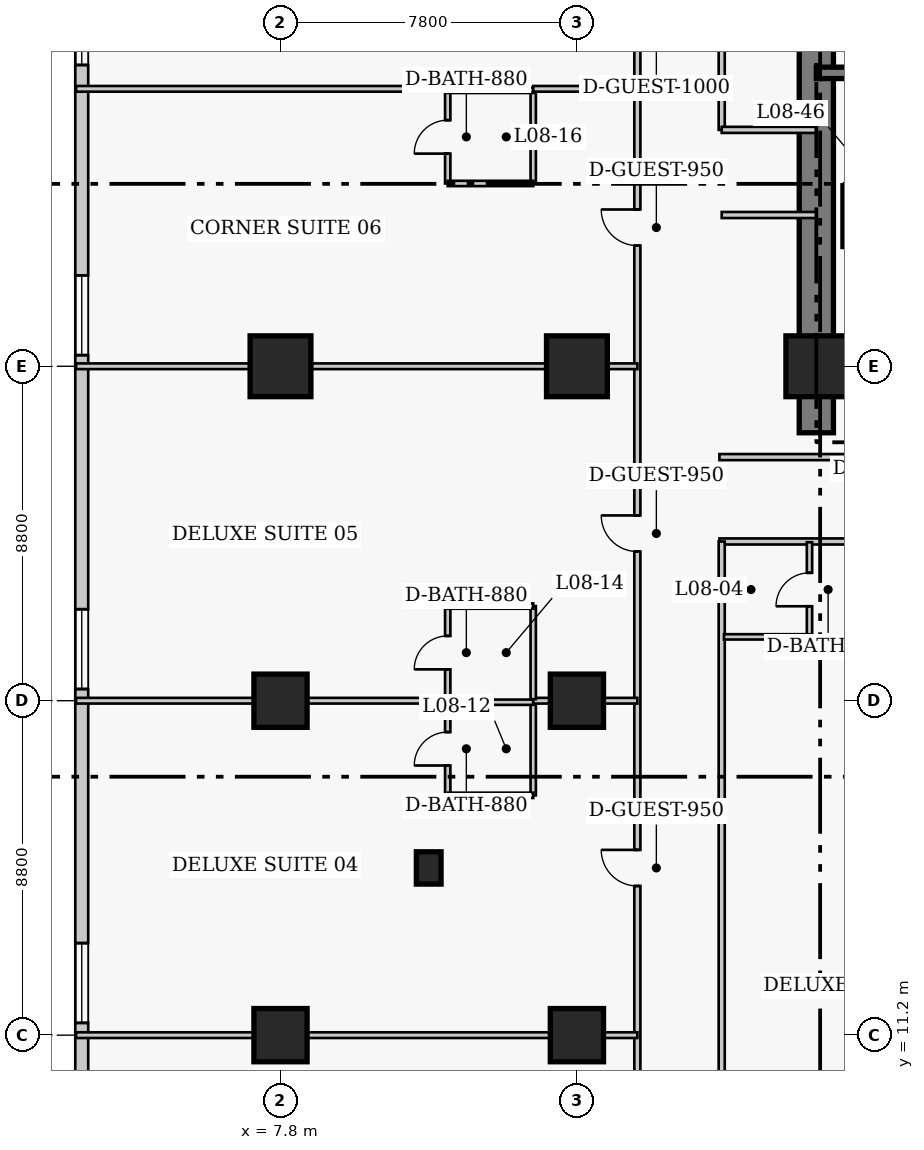
"""IFC4 building model, lengths in metres.
Left out: names, types, materials, properties, quantities, classifications, styles, units other than length and angle.
Written with IfcOpenShell. Run it as: python <this file> out.ifc"""

import sys

from ifc_helpers import new_model, si_unit, direction, frame, frame_2d, origin, origin_2d, place, context, subcontext, project, spatial, rectangle, extrude, element, fill, save


model = new_model("IFC4")
c1 = context("Model", 3, precision=1e-05, world=origin(), true_north=direction((0.0, 1.0)))
c2 = subcontext(c1, "Body", "Model", "MODEL_VIEW")
j1 = project(units=[si_unit("LENGTHUNIT", "METRE"), si_unit("PLANEANGLEUNIT", "RADIAN")], contexts=[c1])
p1 = place(None, origin())
s1 = spatial("IfcSite", under=j1, at=p1, CompositionType="ELEMENT")
p2 = place(p1, origin())
s2 = spatial("IfcBuilding", under=s1, at=p2, CompositionType="ELEMENT")
p3 = place(p2, frame((0.0, 0.0, 37.4)))
s3 = spatial("IfcBuildingStorey", under=s2, at=p3, CompositionType="ELEMENT", Elevation=37.4)
p4 = place(p3, frame((21.9, 27.05, 0.0), z_axis=(0.0, 0.0, 1.0), x_axis=(0.0, 1.0, 0.0)))
e1 = element("IfcWall", 1, at=p4, inside=s3, PredefinedType="SHEAR", context=c2, shape_type="SweptSolid", body=[
    extrude(rectangle(XDim=13.72, YDim=0.9, at=frame_2d((6.86, 0.0))), origin(), (0.0, 0.0, 1.0), 3.8),
])
p5 = place(p3, frame((21.9, 36.52, 0.0), z_axis=(0.0, 0.0, 1.0), x_axis=(1.0, 0.0, 0.0)))
e2 = element("IfcWall", 2, at=p5, inside=s3, PredefinedType="SHEAR", context=c2, shape_type="SweptSolid", body=[
    extrude(rectangle(XDim=8.32, YDim=0.3, at=frame_2d((4.16, 0.0))), origin(), (0.0, 0.0, 1.0), 3.8),
])
p6 = place(p5, frame((0.9, 0.0, 0.0)))
e3 = element("IfcOpeningElement", 3, at=p6, cuts=e2, PredefinedType="OPENING", context=c2, shape_type="SweptSolid", body=[
    extrude(rectangle(XDim=1.1, YDim=2.15, at=frame_2d((0.55, 1.075))), frame((0.0, 0.16, 0.0), z_axis=(0.0, -1.0, 0.0), x_axis=(1.0, 0.0, 0.0)), (0.0, 0.0, 1.0), 0.32),
])
for number, where, z_axis, x_axis in (
    (4, (7.8, 11.2, 0.0), (0.0, 0.0, 1.0), (1.0, 0.0, 0.0)),
    (5, (7.8, 20.0, 0.0), (0.0, 0.0, 1.0), (1.0, 0.0, 0.0)),
):
    element("IfcColumn", number, at=place(p3, frame(where, z_axis=z_axis, x_axis=x_axis)), inside=s3, PredefinedType="COLUMN", context=c2, shape_type="SweptSolid", body=[
        extrude(rectangle(XDim=1.4, YDim=1.4, at=origin_2d()), origin(), (0.0, 0.0, 1.0), 3.8),
    ])
p7 = place(p3, frame((7.8, 28.8, 0.0), z_axis=(0.0, 0.0, 1.0), x_axis=(1.0, 0.0, 0.0)))
e6 = element("IfcColumn", 6, at=p7, inside=s3, PredefinedType="COLUMN", context=c2, shape_type="SweptSolid", body=[
    extrude(rectangle(XDim=1.6, YDim=1.6, at=origin_2d()), origin(), (0.0, 0.0, 1.0), 3.8),
])
for number, where, z_axis, x_axis in (
    (7, (15.6, 11.2, 0.0), (0.0, 0.0, 1.0), (1.0, 0.0, 0.0)),
    (8, (15.6, 20.0, 0.0), (0.0, 0.0, 1.0), (1.0, 0.0, 0.0)),
):
    element("IfcColumn", number, at=place(p3, frame(where, z_axis=z_axis, x_axis=x_axis)), inside=s3, PredefinedType="COLUMN", context=c2, shape_type="SweptSolid", body=[
        extrude(rectangle(XDim=1.4, YDim=1.4, at=origin_2d()), origin(), (0.0, 0.0, 1.0), 3.8),
    ])
for number, where, z_axis, x_axis in (
    (9, (15.6, 28.8, 0.0), (0.0, 0.0, 1.0), (1.0, 0.0, 0.0)),
    (10, (21.9, 28.8, 0.0), (0.0, 0.0, 1.0), (1.0, 0.0, 0.0)),
    (11, (23.4, 32.75, 0.0), (0.0, 0.0, 1.0), (1.0, 0.0, 0.0)),
):
    element("IfcColumn", number, at=place(p3, frame(where, z_axis=z_axis, x_axis=x_axis)), inside=s3, PredefinedType="COLUMN", context=c2, shape_type="SweptSolid", body=[
        extrude(rectangle(XDim=1.6, YDim=1.6, at=origin_2d()), origin(), (0.0, 0.0, 1.0), 3.8),
    ])
p8 = place(p3, frame((11.7, 15.6, 0.0), z_axis=(0.0, 0.0, 1.0), x_axis=(1.0, 0.0, 0.0)))
e12 = element("IfcColumn", 12, at=p8, inside=s3, PredefinedType="PILASTER", context=c2, shape_type="SweptSolid", body=[
    extrude(rectangle(XDim=0.65, YDim=0.85, at=origin_2d()), origin(), (0.0, 0.0, 1.0), 3.8),
])
p9 = place(p3, frame((2.57, 42.17, 0.0), z_axis=(0.0, 0.0, 1.0), x_axis=(0.0, -1.0, 0.0)))
e13 = element("IfcWall", 13, at=p9, inside=s3, PredefinedType="SOLIDWALL", context=c2, shape_type="SweptSolid", body=[
    extrude(rectangle(XDim=35.14, YDim=0.34, at=frame_2d((17.57, 0.0))), origin(), (0.0, 0.0, 1.0), 3.54),
])
p10 = place(p9, frame((3.343, 0.0, 0.85)))
e14 = element("IfcOpeningElement", 14, at=p10, cuts=e13, PredefinedType="OPENING", context=c2, shape_type="SweptSolid", body=[
    extrude(rectangle(XDim=2.1, YDim=1.85, at=frame_2d((1.05, 0.925))), frame((0.0, 0.18, 0.0), z_axis=(0.0, -1.0, 0.0), x_axis=(1.0, 0.0, 0.0)), (0.0, 0.0, 1.0), 0.36),
])
p11 = place(p9, frame((10.978, 0.0, 0.85)))
e15 = element("IfcOpeningElement", 15, at=p11, cuts=e13, PredefinedType="OPENING", context=c2, shape_type="SweptSolid", body=[
    extrude(rectangle(XDim=2.1, YDim=1.85, at=frame_2d((1.05, 0.925))), frame((0.0, 0.18, 0.0), z_axis=(0.0, -1.0, 0.0), x_axis=(1.0, 0.0, 0.0)), (0.0, 0.0, 1.0), 0.36),
])
p12 = place(p9, frame((19.762, 0.0, 0.85)))
e16 = element("IfcOpeningElement", 16, at=p12, cuts=e13, PredefinedType="OPENING", context=c2, shape_type="SweptSolid", body=[
    extrude(rectangle(XDim=2.1, YDim=1.85, at=frame_2d((1.05, 0.925))), frame((0.0, 0.18, 0.0), z_axis=(0.0, -1.0, 0.0), x_axis=(1.0, 0.0, 0.0)), (0.0, 0.0, 1.0), 0.36),
])
p13 = place(p9, frame((28.548, 0.0, 0.85)))
e17 = element("IfcOpeningElement", 17, at=p13, cuts=e13, PredefinedType="OPENING", context=c2, shape_type="SweptSolid", body=[
    extrude(rectangle(XDim=2.1, YDim=1.85, at=frame_2d((1.05, 0.925))), frame((0.0, 0.18, 0.0), z_axis=(0.0, -1.0, 0.0), x_axis=(1.0, 0.0, 0.0)), (0.0, 0.0, 1.0), 0.36),
])
p14 = place(p3, frame((19.35, 26.41, 0.0), z_axis=(0.0, 0.0, 1.0), x_axis=(1.0, 0.0, 0.0)))
e18 = element("IfcWall", 18, at=p14, inside=s3, PredefinedType="PARTITIONING", context=c2, shape_type="SweptSolid", body=[
    extrude(rectangle(XDim=14.3, YDim=0.16, at=frame_2d((7.15, 0.0))), origin(), (0.0, 0.0, 1.0), 3.54),
])
p15 = place(p3, frame((19.35, 24.19, 0.0), z_axis=(0.0, 0.0, 1.0), x_axis=(1.0, 0.0, 0.0)))
e19 = element("IfcWall", 19, at=p15, inside=s3, PredefinedType="PARTITIONING", context=c2, shape_type="SweptSolid", body=[
    extrude(rectangle(XDim=16.45, YDim=0.16, at=frame_2d((8.225, 0.0))), origin(), (0.0, 0.0, 1.0), 3.54),
])
p16 = place(p15, frame((4.288, 0.0, 0.0)))
e20 = element("IfcOpeningElement", 20, at=p16, cuts=e19, PredefinedType="OPENING", context=c2, shape_type="SweptSolid", body=[
    extrude(rectangle(XDim=0.95, YDim=2.1, at=frame_2d((0.475, 1.05))), frame((0.0, 0.09, 0.0), z_axis=(0.0, -1.0, 0.0), x_axis=(1.0, 0.0, 0.0)), (0.0, 0.0, 1.0), 0.18),
])
p17 = place(p15, frame((11.302, 0.0, 0.0)))
e21 = element("IfcOpeningElement", 21, at=p17, cuts=e19, PredefinedType="OPENING", context=c2, shape_type="SweptSolid", body=[
    extrude(rectangle(XDim=1.0, YDim=2.15, at=frame_2d((0.5, 1.075))), frame((0.0, 0.09, 0.0), z_axis=(0.0, -1.0, 0.0), x_axis=(1.0, 0.0, 0.0)), (0.0, 0.0, 1.0), 0.18),
])
p18 = place(p3, frame((17.19, 5.05, 0.0), z_axis=(0.0, 0.0, 1.0), x_axis=(0.0, 1.0, 0.0)))
e22 = element("IfcWall", 22, at=p18, inside=s3, PredefinedType="PARTITIONING", context=c2, shape_type="SweptSolid", body=[
    extrude(rectangle(XDim=35.6, YDim=0.16, at=frame_2d((17.8, 0.0))), origin(), (0.0, 0.0, 1.0), 3.54),
])
p19 = place(p18, frame((2.6, 0.0, 0.0)))
e23 = element("IfcOpeningElement", 23, at=p19, cuts=e22, PredefinedType="OPENING", context=c2, shape_type="SweptSolid", body=[
    extrude(rectangle(XDim=0.95, YDim=2.1, at=frame_2d((0.475, 1.05))), frame((0.0, 0.09, 0.0), z_axis=(0.0, -1.0, 0.0), x_axis=(1.0, 0.0, 0.0)), (0.0, 0.0, 1.0), 0.18),
])
p20 = place(p18, frame((10.075, 0.0, 0.0)))
e24 = element("IfcOpeningElement", 24, at=p20, cuts=e22, PredefinedType="OPENING", context=c2, shape_type="SweptSolid", body=[
    extrude(rectangle(XDim=0.95, YDim=2.1, at=frame_2d((0.475, 1.05))), frame((0.0, 0.09, 0.0), z_axis=(0.0, -1.0, 0.0), x_axis=(1.0, 0.0, 0.0)), (0.0, 0.0, 1.0), 0.18),
])
p21 = place(p18, frame((18.875, 0.0, 0.0)))
e25 = element("IfcOpeningElement", 25, at=p21, cuts=e22, PredefinedType="OPENING", context=c2, shape_type="SweptSolid", body=[
    extrude(rectangle(XDim=0.95, YDim=2.1, at=frame_2d((0.475, 1.05))), frame((0.0, 0.09, 0.0), z_axis=(0.0, -1.0, 0.0), x_axis=(1.0, 0.0, 0.0)), (0.0, 0.0, 1.0), 0.18),
])
p22 = place(p18, frame((26.925, 0.0, 0.0)))
e26 = element("IfcOpeningElement", 26, at=p22, cuts=e22, PredefinedType="OPENING", context=c2, shape_type="SweptSolid", body=[
    extrude(rectangle(XDim=0.95, YDim=2.1, at=frame_2d((0.475, 1.05))), frame((0.0, 0.09, 0.0), z_axis=(0.0, -1.0, 0.0), x_axis=(1.0, 0.0, 0.0)), (0.0, 0.0, 1.0), 0.18),
])
p23 = place(p18, frame((34.16, 0.0, 0.0)))
e27 = element("IfcOpeningElement", 27, at=p23, cuts=e22, PredefinedType="OPENING", context=c2, shape_type="SweptSolid", body=[
    extrude(rectangle(XDim=1.0, YDim=2.15, at=frame_2d((0.5, 1.075))), frame((0.0, 0.09, 0.0), z_axis=(0.0, -1.0, 0.0), x_axis=(1.0, 0.0, 0.0)), (0.0, 0.0, 1.0), 0.18),
])
p24 = place(p3, frame((19.41, 5.05, 0.0), z_axis=(0.0, 0.0, 1.0), x_axis=(0.0, 1.0, 0.0)))
e28 = element("IfcWall", 28, at=p24, inside=s3, PredefinedType="PARTITIONING", context=c2, shape_type="SweptSolid", body=[
    extrude(rectangle(XDim=19.14, YDim=0.16, at=frame_2d((9.57, 0.0))), origin(), (0.0, 0.0, 1.0), 3.004),
])
p25 = place(p3, frame((19.41, 35.02, 0.0), z_axis=(0.0, 0.0, 1.0), x_axis=(0.0, 1.0, 0.0)))
e29 = element("IfcWall", 29, at=p25, inside=s3, PredefinedType="PARTITIONING", context=c2, shape_type="SweptSolid", body=[
    extrude(rectangle(XDim=5.63, YDim=0.16, at=frame_2d((2.815, 0.0))), origin(), (0.0, 0.0, 1.0), 3.54),
])
for number, where, z_axis, x_axis in (
    (30, (19.41, 35.02, 0.0), (0.0, 0.0, 1.0), (1.0, 0.0, 0.0)),
    (31, (19.41, 32.78, 0.0), (0.0, 0.0, 1.0), (1.0, 0.0, 0.0)),
):
    element("IfcWall", number, at=place(p3, frame(where, z_axis=z_axis, x_axis=x_axis)), inside=s3, PredefinedType="PARTITIONING", context=c2, shape_type="SweptSolid", body=[
        extrude(rectangle(XDim=2.49, YDim=0.16, at=frame_2d((1.245, 0.0))), origin(), (0.0, 0.0, 1.0), 3.54),
    ])
p26 = place(p3, frame((21.72, 21.68, 0.0), z_axis=(0.0, 0.0, 1.0), x_axis=(0.0, 1.0, 0.0)))
e32 = element("IfcWall", 32, at=p26, inside=s3, PredefinedType="PLUMBINGWALL", context=c2, shape_type="SweptSolid", body=[
    extrude(rectangle(XDim=2.49, YDim=0.14, at=frame_2d((1.245, 0.0))), origin(), (0.0, 0.0, 1.0), 3.54),
])
p27 = place(p26, frame((0.805, 0.0, 0.0)))
e33 = element("IfcOpeningElement", 33, at=p27, cuts=e32, PredefinedType="OPENING", context=c2, shape_type="SweptSolid", body=[
    extrude(rectangle(XDim=0.88, YDim=2.05, at=frame_2d((0.44, 1.025))), frame((0.0, 0.08, 0.0), z_axis=(0.0, -1.0, 0.0), x_axis=(1.0, 0.0, 0.0)), (0.0, 0.0, 1.0), 0.16),
])
p28 = place(p3, frame((19.47, 21.68, 0.0), z_axis=(0.0, 0.0, 1.0), x_axis=(1.0, 0.0, 0.0)))
e34 = element("IfcWall", 34, at=p28, inside=s3, PredefinedType="PLUMBINGWALL", context=c2, shape_type="SweptSolid", body=[
    extrude(rectangle(XDim=2.25, YDim=0.14, at=frame_2d((1.125, 0.0))), origin(), (0.0, 0.0, 1.0), 3.54),
])
p29 = place(p3, frame((2.42, 11.2, 0.0), z_axis=(0.0, 0.0, 1.0), x_axis=(1.0, 0.0, 0.0)))
e35 = element("IfcWall", 35, at=p29, inside=s3, PredefinedType="PARTITIONING", context=c2, shape_type="SweptSolid", body=[
    extrude(rectangle(XDim=14.77, YDim=0.15, at=frame_2d((7.385, 0.0))), origin(), (0.0, 0.0, 1.0), 2.593),
])
p30 = place(p3, frame((12.2, 17.51, 0.0), z_axis=(0.0, 0.0, 1.0), x_axis=(0.0, 1.0, 0.0)))
e36 = element("IfcWall", 36, at=p30, inside=s3, PredefinedType="PLUMBINGWALL", context=c2, shape_type="SweptSolid", body=[
    extrude(rectangle(XDim=2.45, YDim=0.14, at=frame_2d((1.225, 0.0))), origin(), (0.0, 0.0, 1.0), 3.54),
])
p31 = place(p30, frame((0.785, 0.0, 0.0)))
e37 = element("IfcOpeningElement", 37, at=p31, cuts=e36, PredefinedType="OPENING", context=c2, shape_type="SweptSolid", body=[
    extrude(rectangle(XDim=0.88, YDim=2.05, at=frame_2d((0.44, 1.025))), frame((0.0, 0.08, 0.0), z_axis=(0.0, -1.0, 0.0), x_axis=(1.0, 0.0, 0.0)), (0.0, 0.0, 1.0), 0.16),
])
p32 = place(p3, frame((14.45, 17.51, 0.0), z_axis=(0.0, 0.0, 1.0), x_axis=(0.0, 1.0, 0.0)))
e38 = element("IfcWall", 38, at=p32, inside=s3, PredefinedType="PLUMBINGWALL", context=c2, shape_type="SweptSolid", body=[
    extrude(rectangle(XDim=2.45, YDim=0.14, at=frame_2d((1.225, 0.0))), origin(), (0.0, 0.0, 1.0), 3.54),
])
p33 = place(p3, frame((12.2, 17.51, 0.0), z_axis=(0.0, 0.0, 1.0), x_axis=(1.0, 0.0, 0.0)))
e39 = element("IfcWall", 39, at=p33, inside=s3, PredefinedType="PLUMBINGWALL", context=c2, shape_type="SweptSolid", body=[
    extrude(rectangle(XDim=2.25, YDim=0.14, at=frame_2d((1.125, 0.0))), origin(), (0.0, 0.0, 1.0), 3.54),
])
p34 = place(p3, frame((12.2, 19.96, 0.0), z_axis=(0.0, 0.0, 1.0), x_axis=(1.0, 0.0, 0.0)))
e40 = element("IfcWall", 40, at=p34, inside=s3, PredefinedType="PLUMBINGWALL", context=c2, shape_type="SweptSolid", body=[
    extrude(rectangle(XDim=2.25, YDim=0.14, at=frame_2d((1.125, 0.0))), origin(), (0.0, 0.0, 1.0), 2.593),
])
p35 = place(p3, frame((2.42, 20.0, 0.0), z_axis=(0.0, 0.0, 1.0), x_axis=(1.0, 0.0, 0.0)))
e41 = element("IfcWall", 41, at=p35, inside=s3, PredefinedType="PARTITIONING", context=c2, shape_type="SweptSolid", body=[
    extrude(rectangle(XDim=9.78, YDim=0.15, at=frame_2d((4.89, 0.0))), origin(), (0.0, 0.0, 1.0), 2.593),
])
p36 = place(p3, frame((14.45, 20.0, 0.0), z_axis=(0.0, 0.0, 1.0), x_axis=(1.0, 0.0, 0.0)))
e42 = element("IfcWall", 42, at=p36, inside=s3, PredefinedType="PARTITIONING", context=c2, shape_type="SweptSolid", body=[
    extrude(rectangle(XDim=2.74, YDim=0.15, at=frame_2d((1.37, 0.0))), origin(), (0.0, 0.0, 1.0), 2.593),
])
p37 = place(p3, frame((12.2, 20.04, 0.0), z_axis=(0.0, 0.0, 1.0), x_axis=(0.0, 1.0, 0.0)))
e43 = element("IfcWall", 43, at=p37, inside=s3, PredefinedType="PLUMBINGWALL", context=c2, shape_type="SweptSolid", body=[
    extrude(rectangle(XDim=2.45, YDim=0.14, at=frame_2d((1.225, 0.0))), origin(), (0.0, 0.0, 1.0), 3.54),
])
p38 = place(p37, frame((0.785, 0.0, 0.0)))
e44 = element("IfcOpeningElement", 44, at=p38, cuts=e43, PredefinedType="OPENING", context=c2, shape_type="SweptSolid", body=[
    extrude(rectangle(XDim=0.88, YDim=2.05, at=frame_2d((0.44, 1.025))), frame((0.0, 0.08, 0.0), z_axis=(0.0, -1.0, 0.0), x_axis=(1.0, 0.0, 0.0)), (0.0, 0.0, 1.0), 0.16),
])
p39 = place(p3, frame((14.45, 20.04, 0.0), z_axis=(0.0, 0.0, 1.0), x_axis=(0.0, 1.0, 0.0)))
e45 = element("IfcWall", 45, at=p39, inside=s3, PredefinedType="PLUMBINGWALL", context=c2, shape_type="SweptSolid", body=[
    extrude(rectangle(XDim=2.45, YDim=0.14, at=frame_2d((1.225, 0.0))), origin(), (0.0, 0.0, 1.0), 3.54),
])
p40 = place(p3, frame((12.2, 22.49, 0.0), z_axis=(0.0, 0.0, 1.0), x_axis=(1.0, 0.0, 0.0)))
e46 = element("IfcWall", 46, at=p40, inside=s3, PredefinedType="PLUMBINGWALL", context=c2, shape_type="SweptSolid", body=[
    extrude(rectangle(XDim=2.25, YDim=0.14, at=frame_2d((1.125, 0.0))), origin(), (0.0, 0.0, 1.0), 3.54),
])
p41 = place(p3, frame((2.42, 28.8, 0.0), z_axis=(0.0, 0.0, 1.0), x_axis=(1.0, 0.0, 0.0)))
e47 = element("IfcWall", 47, at=p41, inside=s3, PredefinedType="PARTITIONING", context=c2, shape_type="SweptSolid", body=[
    extrude(rectangle(XDim=14.77, YDim=0.15, at=frame_2d((7.385, 0.0))), origin(), (0.0, 0.0, 1.0), 2.593),
])
p42 = place(p3, frame((12.2, 33.61, 0.0), z_axis=(0.0, 0.0, 1.0), x_axis=(0.0, 1.0, 0.0)))
e48 = element("IfcWall", 48, at=p42, inside=s3, PredefinedType="PLUMBINGWALL", context=c2, shape_type="SweptSolid", body=[
    extrude(rectangle(XDim=2.45, YDim=0.14, at=frame_2d((1.225, 0.0))), origin(), (0.0, 0.0, 1.0), 3.54),
])
p43 = place(p42, frame((0.785, 0.0, 0.0)))
e49 = element("IfcOpeningElement", 49, at=p43, cuts=e48, PredefinedType="OPENING", context=c2, shape_type="SweptSolid", body=[
    extrude(rectangle(XDim=0.88, YDim=2.05, at=frame_2d((0.44, 1.025))), frame((0.0, 0.08, 0.0), z_axis=(0.0, -1.0, 0.0), x_axis=(1.0, 0.0, 0.0)), (0.0, 0.0, 1.0), 0.16),
])
p44 = place(p3, frame((14.45, 33.61, 0.0), z_axis=(0.0, 0.0, 1.0), x_axis=(0.0, 1.0, 0.0)))
e50 = element("IfcWall", 50, at=p44, inside=s3, PredefinedType="PLUMBINGWALL", context=c2, shape_type="SweptSolid", body=[
    extrude(rectangle(XDim=2.45, YDim=0.14, at=frame_2d((1.225, 0.0))), origin(), (0.0, 0.0, 1.0), 3.54),
])
for number, where, z_axis, x_axis in (
    (51, (12.2, 33.61, 0.0), (0.0, 0.0, 1.0), (1.0, 0.0, 0.0)),
    (52, (12.2, 36.06, 0.0), (0.0, 0.0, 1.0), (1.0, 0.0, 0.0)),
):
    element("IfcWall", number, at=place(p3, frame(where, z_axis=z_axis, x_axis=x_axis)), inside=s3, PredefinedType="PLUMBINGWALL", context=c2, shape_type="SweptSolid", body=[
        extrude(rectangle(XDim=2.25, YDim=0.14, at=frame_2d((1.125, 0.0))), origin(), (0.0, 0.0, 1.0), 3.54),
    ])
p45 = place(p3, frame((2.42, 36.1, 0.0), z_axis=(0.0, 0.0, 1.0), x_axis=(1.0, 0.0, 0.0)))
e53 = element("IfcWall", 53, at=p45, inside=s3, PredefinedType="PARTITIONING", context=c2, shape_type="SweptSolid", body=[
    extrude(rectangle(XDim=9.78, YDim=0.15, at=frame_2d((4.89, 0.0))), origin(), (0.0, 0.0, 1.0), 3.54),
])
p46 = place(p3, frame((14.45, 36.1, 0.0), z_axis=(0.0, 0.0, 1.0), x_axis=(1.0, 0.0, 0.0)))
e54 = element("IfcWall", 54, at=p46, inside=s3, PredefinedType="PARTITIONING", context=c2, shape_type="SweptSolid", body=[
    extrude(rectangle(XDim=2.74, YDim=0.15, at=frame_2d((1.37, 0.0))), origin(), (0.0, 0.0, 1.0), 3.54),
])
p47 = place(p10, origin())
e55 = element("IfcWindow", 55, at=p47, inside=s3, PartitioningType="SINGLE_PANEL", PredefinedType="WINDOW", context=c2, shape_type="SweptSolid", body=[
    extrude(rectangle(XDim=2.1, YDim=1.85, at=frame_2d((1.05, 0.925))), frame((0.0, 0.03, 0.0), z_axis=(0.0, -1.0, 0.0), x_axis=(1.0, 0.0, 0.0)), (0.0, 0.0, 1.0), 0.06),
])
fill(e14, e55)
p48 = place(p11, origin())
e56 = element("IfcWindow", 56, at=p48, inside=s3, PartitioningType="SINGLE_PANEL", PredefinedType="WINDOW", context=c2, shape_type="SweptSolid", body=[
    extrude(rectangle(XDim=2.1, YDim=1.85, at=frame_2d((1.05, 0.925))), frame((0.0, 0.03, 0.0), z_axis=(0.0, -1.0, 0.0), x_axis=(1.0, 0.0, 0.0)), (0.0, 0.0, 1.0), 0.06),
])
fill(e15, e56)
p49 = place(p12, origin())
e57 = element("IfcWindow", 57, at=p49, inside=s3, PartitioningType="SINGLE_PANEL", PredefinedType="WINDOW", context=c2, shape_type="SweptSolid", body=[
    extrude(rectangle(XDim=2.1, YDim=1.85, at=frame_2d((1.05, 0.925))), frame((0.0, 0.03, 0.0), z_axis=(0.0, -1.0, 0.0), x_axis=(1.0, 0.0, 0.0)), (0.0, 0.0, 1.0), 0.06),
])
fill(e16, e57)
p50 = place(p13, origin())
e58 = element("IfcWindow", 58, at=p50, inside=s3, PartitioningType="SINGLE_PANEL", PredefinedType="WINDOW", context=c2, shape_type="SweptSolid", body=[
    extrude(rectangle(XDim=2.1, YDim=1.85, at=frame_2d((1.05, 0.925))), frame((0.0, 0.03, 0.0), z_axis=(0.0, -1.0, 0.0), x_axis=(1.0, 0.0, 0.0)), (0.0, 0.0, 1.0), 0.06),
])
fill(e17, e58)
p51 = place(p27, origin())
e59 = element("IfcDoor", 59, at=p51, inside=s3, OperationType="SINGLE_SWING_LEFT", PredefinedType="DOOR", context=c2, shape_type="SweptSolid", body=[
    extrude(rectangle(XDim=0.88, YDim=2.05, at=frame_2d((0.44, 1.025))), frame((0.0, 0.025, 0.0), z_axis=(0.0, -1.0, 0.0), x_axis=(1.0, 0.0, 0.0)), (0.0, 0.0, 1.0), 0.05),
])
fill(e33, e59)
p52 = place(p31, origin())
e60 = element("IfcDoor", 60, at=p52, inside=s3, OperationType="SINGLE_SWING_LEFT", PredefinedType="DOOR", context=c2, shape_type="SweptSolid", body=[
    extrude(rectangle(XDim=0.88, YDim=2.05, at=frame_2d((0.44, 1.025))), frame((0.0, 0.025, 0.0), z_axis=(0.0, -1.0, 0.0), x_axis=(1.0, 0.0, 0.0)), (0.0, 0.0, 1.0), 0.05),
])
fill(e37, e60)
p53 = place(p20, origin())
e61 = element("IfcDoor", 61, at=p53, inside=s3, OperationType="SINGLE_SWING_RIGHT", PredefinedType="DOOR", context=c2, shape_type="SweptSolid", body=[
    extrude(rectangle(XDim=0.95, YDim=2.1, at=frame_2d((0.475, 1.05))), frame((0.0, 0.025, 0.0), z_axis=(0.0, -1.0, 0.0), x_axis=(1.0, 0.0, 0.0)), (0.0, 0.0, 1.0), 0.05),
])
fill(e24, e61)
p54 = place(p38, origin())
e62 = element("IfcDoor", 62, at=p54, inside=s3, OperationType="SINGLE_SWING_LEFT", PredefinedType="DOOR", context=c2, shape_type="SweptSolid", body=[
    extrude(rectangle(XDim=0.88, YDim=2.05, at=frame_2d((0.44, 1.025))), frame((0.0, 0.025, 0.0), z_axis=(0.0, -1.0, 0.0), x_axis=(1.0, 0.0, 0.0)), (0.0, 0.0, 1.0), 0.05),
])
fill(e44, e62)
p55 = place(p21, origin())
e63 = element("IfcDoor", 63, at=p55, inside=s3, OperationType="SINGLE_SWING_RIGHT", PredefinedType="DOOR", context=c2, shape_type="SweptSolid", body=[
    extrude(rectangle(XDim=0.95, YDim=2.1, at=frame_2d((0.475, 1.05))), frame((0.0, 0.025, 0.0), z_axis=(0.0, -1.0, 0.0), x_axis=(1.0, 0.0, 0.0)), (0.0, 0.0, 1.0), 0.05),
])
fill(e25, e63)
p56 = place(p43, origin())
e64 = element("IfcDoor", 64, at=p56, inside=s3, OperationType="SINGLE_SWING_LEFT", PredefinedType="DOOR", context=c2, shape_type="SweptSolid", body=[
    extrude(rectangle(XDim=0.88, YDim=2.05, at=frame_2d((0.44, 1.025))), frame((0.0, 0.025, 0.0), z_axis=(0.0, -1.0, 0.0), x_axis=(1.0, 0.0, 0.0)), (0.0, 0.0, 1.0), 0.05),
])
fill(e49, e64)
p57 = place(p22, origin())
e65 = element("IfcDoor", 65, at=p57, inside=s3, OperationType="SINGLE_SWING_RIGHT", PredefinedType="DOOR", context=c2, shape_type="SweptSolid", body=[
    extrude(rectangle(XDim=0.95, YDim=2.1, at=frame_2d((0.475, 1.05))), frame((0.0, 0.025, 0.0), z_axis=(0.0, -1.0, 0.0), x_axis=(1.0, 0.0, 0.0)), (0.0, 0.0, 1.0), 0.05),
])
fill(e26, e65)
save(model, sys.argv[1])
